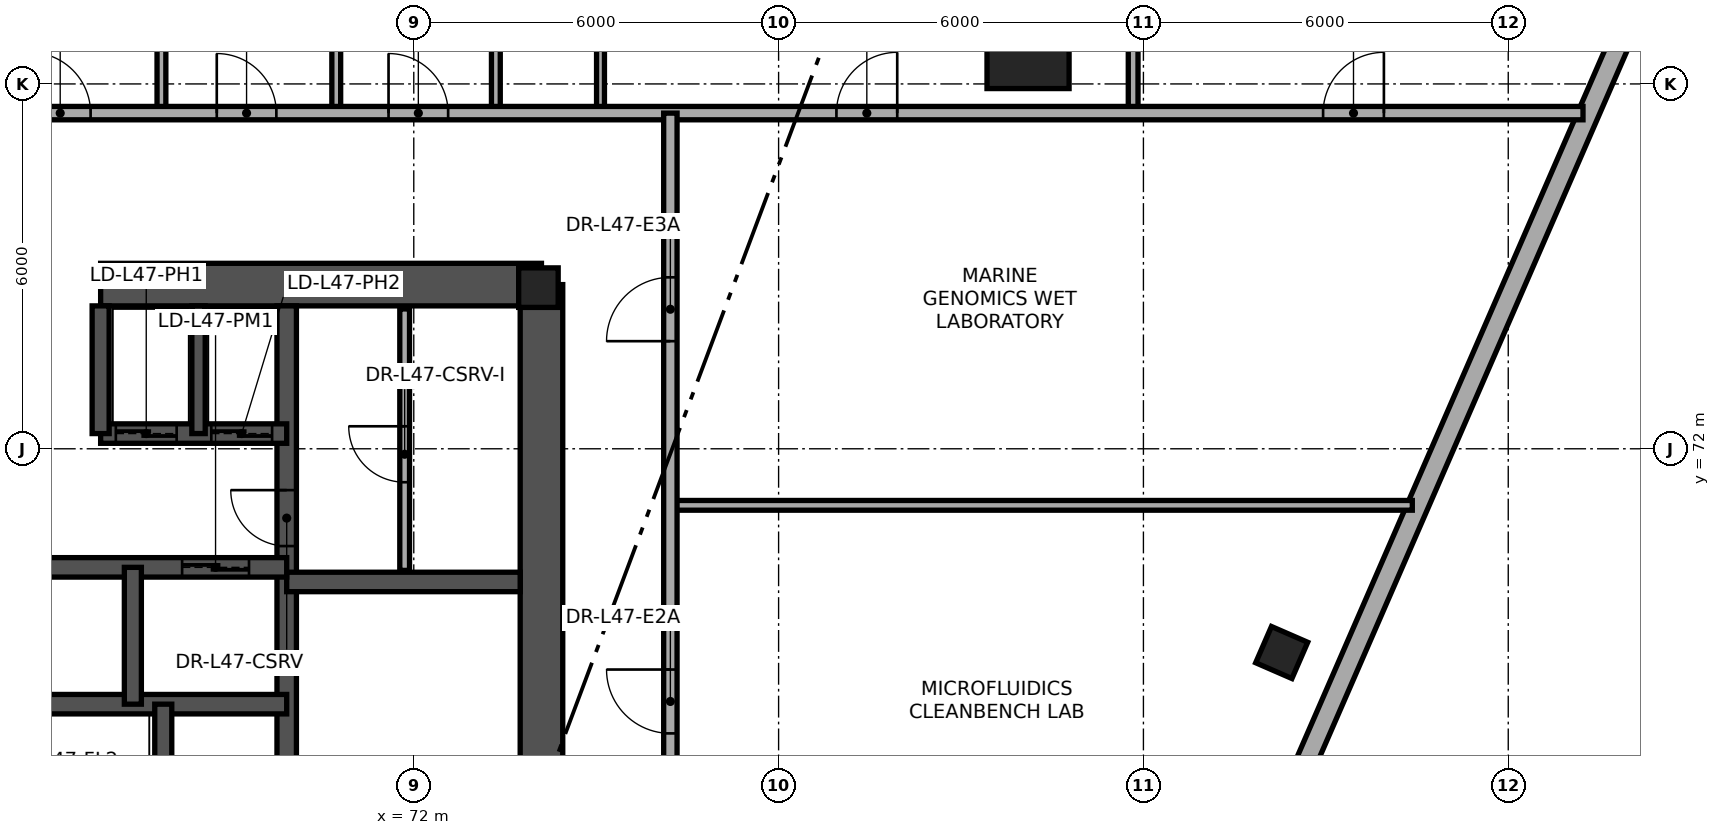
"""IFC4 building model, lengths in metres.
Left out: names, types, materials, properties, quantities, classifications, styles, units other than length and angle.
Written with IfcOpenShell. Run it as: python <this file> out.ifc"""

import sys

from ifc_helpers import new_model, si_unit, direction, frame, frame_2d, origin, origin_2d, place, context, subcontext, project, spatial, rectangle, extrude, element, fill, save


model = new_model("IFC4")
c1 = context("Model", 3, precision=1e-05, world=origin(), true_north=direction((0.0, 1.0)))
c2 = subcontext(c1, "Body", "Model", "MODEL_VIEW")
j1 = project(units=[si_unit("LENGTHUNIT", "METRE"), si_unit("PLANEANGLEUNIT", "RADIAN")], contexts=[c1])
p1 = place(None, origin())
s1 = spatial("IfcSite", under=j1, at=p1, CompositionType="ELEMENT")
p2 = place(p1, origin())
s2 = spatial("IfcBuilding", under=s1, at=p2, CompositionType="ELEMENT")
p3 = place(p2, frame((0.0, 0.0, 179.4)))
s3 = spatial("IfcBuildingStorey", under=s2, at=p3, CompositionType="ELEMENT", Elevation=179.4)
p4 = place(p3, frame((74.1, 61.3, 0.0), z_axis=(0.0, 0.0, 1.0), x_axis=(0.0, 1.0, 0.0)))
e1 = element("IfcWall", 1, at=p4, inside=s3, PredefinedType="SHEAR", context=c2, shape_type="SweptSolid", body=[
    extrude(rectangle(XDim=13.4, YDim=0.7, at=frame_2d((6.7, 0.0))), origin(), (0.0, 0.0, 1.0), 3.65),
])
p5 = place(p3, frame((74.1, 74.7, 0.0), z_axis=(0.0, 0.0, 1.0), x_axis=(-1.0, 0.0, 0.0)))
e2 = element("IfcWall", 2, at=p5, inside=s3, PredefinedType="SHEAR", context=c2, shape_type="SweptSolid", body=[
    extrude(rectangle(XDim=7.25, YDim=0.7, at=frame_2d((3.625, 0.0))), origin(), (0.0, 0.0, 1.0), 3.65),
])
p6 = place(p3, frame((69.91, 61.65, 0.0), z_axis=(0.0, 0.0, 1.0), x_axis=(0.0, 1.0, 0.0)))
e3 = element("IfcWall", 3, at=p6, inside=s3, PredefinedType="SHEAR", context=c2, shape_type="SweptSolid", body=[
    extrude(rectangle(XDim=12.7, YDim=0.32, at=frame_2d((6.35, 0.0))), origin(), (0.0, 0.0, 1.0), 3.65),
])
p7 = place(p6, frame((8.75, 0.0, 0.0)))
e4 = element("IfcOpeningElement", 4, at=p7, cuts=e3, PredefinedType="OPENING", context=c2, shape_type="SweptSolid", body=[
    extrude(rectangle(XDim=0.92, YDim=2.05, at=frame_2d((0.46, 1.025))), frame((0.0, 0.17, 0.0), z_axis=(0.0, -1.0, 0.0), x_axis=(1.0, 0.0, 0.0)), (0.0, 0.0, 1.0), 0.34),
])
p8 = place(p3, frame((69.91, 69.81, 0.0), z_axis=(0.0, 0.0, 1.0), x_axis=(1.0, 0.0, 0.0)))
e5 = element("IfcWall", 5, at=p8, inside=s3, PredefinedType="SHEAR", context=c2, shape_type="SweptSolid", body=[
    extrude(rectangle(XDim=3.84, YDim=0.32, at=frame_2d((1.92, 0.0))), origin(), (0.0, 0.0, 1.0), 3.65),
])
p9 = place(p3, frame((62.09, 67.8, 0.0), z_axis=(0.0, 0.0, 1.0), x_axis=(1.0, 0.0, 0.0)))
e6 = element("IfcWall", 6, at=p9, inside=s3, PredefinedType="SHEAR", context=c2, shape_type="SweptSolid", body=[
    extrude(rectangle(XDim=7.82, YDim=0.32, at=frame_2d((3.91, 0.0))), origin(), (0.0, 0.0, 1.0), 3.65),
])
p10 = place(p3, frame((62.09, 70.05, 0.0), z_axis=(0.0, 0.0, 1.0), x_axis=(1.0, 0.0, 0.0)))
e7 = element("IfcWall", 7, at=p10, inside=s3, PredefinedType="SHEAR", context=c2, shape_type="SweptSolid", body=[
    extrude(rectangle(XDim=7.82, YDim=0.32, at=frame_2d((3.91, 0.0))), origin(), (0.0, 0.0, 1.0), 3.65),
])
p11 = place(p10, frame((1.8, 0.0, 0.0)))
e8 = element("IfcOpeningElement", 8, at=p11, cuts=e7, PredefinedType="OPENING", context=c2, shape_type="SweptSolid", body=[
    extrude(rectangle(XDim=1.05, YDim=2.15, at=frame_2d((0.525, 1.075))), frame((0.0, 0.17, 0.0), z_axis=(0.0, -1.0, 0.0), x_axis=(1.0, 0.0, 0.0)), (0.0, 0.0, 1.0), 0.34),
])
p12 = place(p10, frame((6.1, 0.0, 0.0)))
e9 = element("IfcOpeningElement", 9, at=p12, cuts=e7, PredefinedType="OPENING", context=c2, shape_type="SweptSolid", body=[
    extrude(rectangle(XDim=1.1, YDim=2.2, at=frame_2d((0.55, 1.1))), frame((0.0, 0.17, 0.0), z_axis=(0.0, -1.0, 0.0), x_axis=(1.0, 0.0, 0.0)), (0.0, 0.0, 1.0), 0.34),
])
p13 = place(p3, frame((66.85, 72.25, 0.0), z_axis=(0.0, 0.0, 1.0), x_axis=(1.0, 0.0, 0.0)))
e10 = element("IfcWall", 10, at=p13, inside=s3, PredefinedType="SHEAR", context=c2, shape_type="SweptSolid", body=[
    extrude(rectangle(XDim=3.06, YDim=0.32, at=frame_2d((1.53, 0.0))), origin(), (0.0, 0.0, 1.0), 3.65),
])
p14 = place(p13, frame((0.25, 0.0, 0.0)))
e11 = element("IfcOpeningElement", 11, at=p14, cuts=e10, PredefinedType="OPENING", context=c2, shape_type="SweptSolid", body=[
    extrude(rectangle(XDim=1.0, YDim=2.2, at=frame_2d((0.5, 1.1))), frame((0.0, 0.17, 0.0), z_axis=(0.0, -1.0, 0.0), x_axis=(1.0, 0.0, 0.0)), (0.0, 0.0, 1.0), 0.34),
])
p15 = place(p13, frame((1.82, 0.0, 0.0)))
e12 = element("IfcOpeningElement", 12, at=p15, cuts=e10, PredefinedType="OPENING", context=c2, shape_type="SweptSolid", body=[
    extrude(rectangle(XDim=1.0, YDim=2.2, at=frame_2d((0.5, 1.1))), frame((0.0, 0.17, 0.0), z_axis=(0.0, -1.0, 0.0), x_axis=(1.0, 0.0, 0.0)), (0.0, 0.0, 1.0), 0.34),
])
p16 = place(p3, frame((66.85, 72.25, 0.0), z_axis=(0.0, 0.0, 1.0), x_axis=(0.0, 1.0, 0.0)))
e13 = element("IfcWall", 13, at=p16, inside=s3, PredefinedType="SHEAR", context=c2, shape_type="SweptSolid", body=[
    extrude(rectangle(XDim=2.1, YDim=0.28, at=frame_2d((1.05, 0.0))), origin(), (0.0, 0.0, 1.0), 3.65),
])
p17 = place(p3, frame((68.46, 72.25, 0.0), z_axis=(0.0, 0.0, 1.0), x_axis=(0.0, 1.0, 0.0)))
e14 = element("IfcWall", 14, at=p17, inside=s3, PredefinedType="SHEAR", context=c2, shape_type="SweptSolid", body=[
    extrude(rectangle(XDim=2.1, YDim=0.22, at=frame_2d((1.05, 0.0))), origin(), (0.0, 0.0, 1.0), 3.65),
])
p18 = place(p3, frame((67.88, 61.65, 0.0), z_axis=(0.0, 0.0, 1.0), x_axis=(0.0, 1.0, 0.0)))
e15 = element("IfcWall", 15, at=p18, inside=s3, PredefinedType="SHEAR", context=c2, shape_type="SweptSolid", body=[
    extrude(rectangle(XDim=6.15, YDim=0.28, at=frame_2d((3.075, 0.0))), origin(), (0.0, 0.0, 1.0), 3.65),
])
p19 = place(p18, frame((1.1, 0.0, 0.0)))
e16 = element("IfcOpeningElement", 16, at=p19, cuts=e15, PredefinedType="OPENING", context=c2, shape_type="SweptSolid", body=[
    extrude(rectangle(XDim=0.92, YDim=2.05, at=frame_2d((0.46, 1.025))), frame((0.0, 0.15, 0.0), z_axis=(0.0, -1.0, 0.0), x_axis=(1.0, 0.0, 0.0)), (0.0, 0.0, 1.0), 0.3),
])
p20 = place(p3, frame((67.38, 67.8, 0.0), z_axis=(0.0, 0.0, 1.0), x_axis=(0.0, 1.0, 0.0)))
e17 = element("IfcWall", 17, at=p20, inside=s3, PredefinedType="SHEAR", context=c2, shape_type="SweptSolid", body=[
    extrude(rectangle(XDim=2.25, YDim=0.28, at=frame_2d((1.125, 0.0))), origin(), (0.0, 0.0, 1.0), 3.65),
])
p21 = place(p3, frame((74.05, 74.65, 0.0), z_axis=(0.0, 0.0, 1.0), x_axis=(1.0, 0.0, 0.0)))
e18 = element("IfcColumn", 18, at=p21, inside=s3, PredefinedType="COLUMN", context=c2, shape_type="SweptSolid", body=[
    extrude(rectangle(XDim=0.65, YDim=0.65, at=origin_2d()), origin(), (0.0, 0.0, 1.0), 3.65),
])
p22 = place(p3, frame((82.102, 78.599, 0.0), z_axis=(0.0, 0.0, 1.0), x_axis=(1.0, 0.0, 0.0)))
e19 = element("IfcColumn", 19, at=p22, inside=s3, PredefinedType="COLUMN", context=c2, shape_type="SweptSolid", body=[
    extrude(rectangle(XDim=1.35, YDim=1.35, at=origin_2d()), origin(), (0.0, 0.0, 1.0), 3.65),
])
p23 = place(p3, frame((86.346, 68.66, 0.003), z_axis=(-0.039229493406, -0.00569028488, 0.999214024874), x_axis=(0.963969673558, -0.263517553175, 0.036345118363)))
e20 = element("IfcColumn", 20, at=p23, inside=s3, PredefinedType="COLUMN", context=c2, shape_type="SweptSolid", body=[
    extrude(rectangle(XDim=0.65, YDim=0.65, at=origin_2d()), origin(), (0.0, 0.0, 1.0), 3.647),
])
p24 = place(p3, frame((92.464, 80.144, 0.0), z_axis=(0.0, 0.0, 1.0), x_axis=(-0.399091286562, -0.916911197985, 0.0)))
e21 = element("IfcWall", 21, at=p24, inside=s3, PredefinedType="STANDARD", context=c2, shape_type="SweptSolid", body=[
    extrude(rectangle(XDim=54.364, YDim=0.34, at=frame_2d((27.182, 0.0))), origin(), (0.0, 0.0, 1.0), 0.85),
])
p25 = place(p3, frame((71.85, 70.0, 0.0), z_axis=(0.0, 0.0, 1.0), x_axis=(0.0, 1.0, 0.0)))
e22 = element("IfcWall", 22, at=p25, inside=s3, PredefinedType="PARTITIONING", context=c2, shape_type="SweptSolid", body=[
    extrude(rectangle(XDim=4.3, YDim=0.16, at=frame_2d((2.15, 0.0))), origin(), (0.0, 0.0, 1.0), 3.4),
])
p26 = place(p25, frame((1.45, 0.0, 0.0)))
e23 = element("IfcOpeningElement", 23, at=p26, cuts=e22, PredefinedType="OPENING", context=c2, shape_type="SweptSolid", body=[
    extrude(rectangle(XDim=0.92, YDim=2.05, at=frame_2d((0.46, 1.025))), frame((0.0, 0.09, 0.0), z_axis=(0.0, -1.0, 0.0), x_axis=(1.0, 0.0, 0.0)), (0.0, 0.0, 1.0), 0.18),
])
for number, where, z_axis, x_axis in (
    (24, (67.85, 77.52, 0.0), (0.0, 0.0, 1.0), (0.0, 1.0, 0.0)),
    (25, (70.725, 77.52, 0.0), (0.0, 0.0, 1.0), (0.0, 1.0, 0.0)),
):
    element("IfcWall", number, at=place(p3, frame(where, z_axis=z_axis, x_axis=x_axis)), inside=s3, PredefinedType="PARTITIONING", context=c2, shape_type="SweptSolid", body=[
        extrude(rectangle(XDim=2.55, YDim=0.145, at=frame_2d((1.275, 0.0))), origin(), (0.0, 0.0, 1.0), 2.78),
    ])
p27 = place(p3, frame((73.35, 77.52, 0.0), z_axis=(0.0, 0.0, 1.0), x_axis=(0.0, 1.0, 0.0)))
e26 = element("IfcWall", 26, at=p27, inside=s3, PredefinedType="PARTITIONING", context=c2, shape_type="SweptSolid", body=[
    extrude(rectangle(XDim=2.55, YDim=0.145, at=frame_2d((1.275, 0.0))), origin(), (0.0, 0.0, 1.0), 3.4),
])
p28 = place(p3, frame((75.071, 77.52, 0.0), z_axis=(0.0, 0.0, 1.0), x_axis=(0.0, 1.0, 0.0)))
e27 = element("IfcWall", 27, at=p28, inside=s3, PredefinedType="PARTITIONING", context=c2, shape_type="SweptSolid", body=[
    extrude(rectangle(XDim=9.814, YDim=0.13, at=frame_2d((4.907, 0.0))), origin(), (0.0, 0.0, 1.0), 2.6),
])
p29 = place(p3, frame((83.831, 77.52, 0.0), z_axis=(0.0, 0.0, 1.0), x_axis=(0.0, 1.0, 0.0)))
e28 = element("IfcWall", 28, at=p29, inside=s3, PredefinedType="PARTITIONING", context=c2, shape_type="SweptSolid", body=[
    extrude(rectangle(XDim=9.814, YDim=0.16, at=frame_2d((4.907, 0.0))), origin(), (0.0, 0.0, 1.0), 3.4),
])
p30 = place(p3, frame((57.55, 77.52, 0.0), z_axis=(0.0, 0.0, 1.0), x_axis=(1.0, 0.0, 0.0)))
e29 = element("IfcWall", 29, at=p30, inside=s3, PredefinedType="PARTITIONING", context=c2, shape_type="SweptSolid", body=[
    extrude(rectangle(XDim=33.679, YDim=0.22, at=frame_2d((16.84, 0.0))), origin(), (0.0, 0.0, 1.0), 2.6),
])
p31 = place(p30, frame((11.21, 0.0, 0.0)))
e30 = element("IfcOpeningElement", 30, at=p31, cuts=e29, PredefinedType="OPENING", context=c2, shape_type="SweptSolid", body=[
    extrude(rectangle(XDim=0.98, YDim=2.1, at=frame_2d((0.49, 1.05))), frame((0.0, 0.12, 0.0), z_axis=(0.0, -1.0, 0.0), x_axis=(1.0, 0.0, 0.0)), (0.0, 0.0, 1.0), 0.24),
])
p32 = place(p30, frame((14.035, 0.0, 0.0)))
e31 = element("IfcOpeningElement", 31, at=p32, cuts=e29, PredefinedType="OPENING", context=c2, shape_type="SweptSolid", body=[
    extrude(rectangle(XDim=0.98, YDim=2.1, at=frame_2d((0.49, 1.05))), frame((0.0, 0.12, 0.0), z_axis=(0.0, -1.0, 0.0), x_axis=(1.0, 0.0, 0.0)), (0.0, 0.0, 1.0), 0.24),
])
p33 = place(p30, frame((3.1, 0.0, 0.0)))
e32 = element("IfcOpeningElement", 32, at=p33, cuts=e29, PredefinedType="OPENING", context=c2, shape_type="SweptSolid", body=[
    extrude(rectangle(XDim=1.0, YDim=2.1, at=frame_2d((0.5, 1.05))), frame((0.0, 0.12, 0.0), z_axis=(0.0, -1.0, 0.0), x_axis=(1.0, 0.0, 0.0)), (0.0, 0.0, 1.0), 0.24),
])
p34 = place(p30, frame((8.135, 0.0, 0.0)))
e33 = element("IfcOpeningElement", 33, at=p34, cuts=e29, PredefinedType="OPENING", context=c2, shape_type="SweptSolid", body=[
    extrude(rectangle(XDim=1.0, YDim=2.1, at=frame_2d((0.5, 1.05))), frame((0.0, 0.12, 0.0), z_axis=(0.0, -1.0, 0.0), x_axis=(1.0, 0.0, 0.0)), (0.0, 0.0, 1.0), 0.24),
])
p35 = place(p30, frame((21.401, 0.0, 0.0)))
e34 = element("IfcOpeningElement", 34, at=p35, cuts=e29, PredefinedType="OPENING", context=c2, shape_type="SweptSolid", body=[
    extrude(rectangle(XDim=1.0, YDim=2.1, at=frame_2d((0.5, 1.05))), frame((0.0, 0.12, 0.0), z_axis=(0.0, -1.0, 0.0), x_axis=(1.0, 0.0, 0.0)), (0.0, 0.0, 1.0), 0.24),
])
p36 = place(p30, frame((29.405, 0.0, 0.0)))
e35 = element("IfcOpeningElement", 35, at=p36, cuts=e29, PredefinedType="OPENING", context=c2, shape_type="SweptSolid", body=[
    extrude(rectangle(XDim=1.0, YDim=2.1, at=frame_2d((0.5, 1.05))), frame((0.0, 0.12, 0.0), z_axis=(0.0, -1.0, 0.0), x_axis=(1.0, 0.0, 0.0)), (0.0, 0.0, 1.0), 0.24),
])
p37 = place(p3, frame((76.22, 71.07, 0.0), z_axis=(0.0, 0.0, 1.0), x_axis=(1.0, 0.0, 0.0)))
e36 = element("IfcWall", 36, at=p37, inside=s3, PredefinedType="PARTITIONING", context=c2, shape_type="SweptSolid", body=[
    extrude(rectangle(XDim=12.202, YDim=0.16, at=frame_2d((6.101, 0.0))), origin(), (0.0, 0.0, 1.0), 2.6),
])
p38 = place(p3, frame((76.22, 43.036, 0.0), z_axis=(0.0, 0.0, 1.0), x_axis=(0.0, 1.0, 0.0)))
e37 = element("IfcWall", 37, at=p38, inside=s3, PredefinedType="PARTITIONING", context=c2, shape_type="SweptSolid", body=[
    extrude(rectangle(XDim=34.484, YDim=0.22, at=frame_2d((17.242, 0.0))), origin(), (0.0, 0.0, 1.0), 2.6),
])
p39 = place(p38, frame((17.834, 0.0, 0.0)))
e38 = element("IfcOpeningElement", 38, at=p39, cuts=e37, PredefinedType="OPENING", context=c2, shape_type="SweptSolid", body=[
    extrude(rectangle(XDim=1.05, YDim=2.15, at=frame_2d((0.525, 1.075))), frame((0.0, 0.12, 0.0), z_axis=(0.0, -1.0, 0.0), x_axis=(1.0, 0.0, 0.0)), (0.0, 0.0, 1.0), 0.24),
])
p40 = place(p38, frame((24.284, 0.0, 0.0)))
e39 = element("IfcOpeningElement", 39, at=p40, cuts=e37, PredefinedType="OPENING", context=c2, shape_type="SweptSolid", body=[
    extrude(rectangle(XDim=1.05, YDim=2.15, at=frame_2d((0.525, 1.075))), frame((0.0, 0.12, 0.0), z_axis=(0.0, -1.0, 0.0), x_axis=(1.0, 0.0, 0.0)), (0.0, 0.0, 1.0), 0.24),
])
p41 = place(p38, frame((30.734, 0.0, 0.0)))
e40 = element("IfcOpeningElement", 40, at=p41, cuts=e37, PredefinedType="OPENING", context=c2, shape_type="SweptSolid", body=[
    extrude(rectangle(XDim=1.05, YDim=2.15, at=frame_2d((0.525, 1.075))), frame((0.0, 0.12, 0.0), z_axis=(0.0, -1.0, 0.0), x_axis=(1.0, 0.0, 0.0)), (0.0, 0.0, 1.0), 0.24),
])
p42 = place(p12, origin())
e41 = element("IfcDoor", 41, at=p42, inside=s3, OperationType="SLIDING_TO_LEFT", PredefinedType="DOOR", context=c2, shape_type="SweptSolid", body=[
    extrude(rectangle(XDim=1.1, YDim=2.2, at=frame_2d((0.55, 1.1))), frame((0.0, 0.025, 0.0), z_axis=(0.0, -1.0, 0.0), x_axis=(1.0, 0.0, 0.0)), (0.0, 0.0, 1.0), 0.05),
])
fill(e9, e41)
p43 = place(p14, origin())
e42 = element("IfcDoor", 42, at=p43, inside=s3, OperationType="SLIDING_TO_LEFT", PredefinedType="DOOR", context=c2, shape_type="SweptSolid", body=[
    extrude(rectangle(XDim=1.0, YDim=2.2, at=frame_2d((0.5, 1.1))), frame((0.0, 0.025, 0.0), z_axis=(0.0, -1.0, 0.0), x_axis=(1.0, 0.0, 0.0)), (0.0, 0.0, 1.0), 0.05),
])
fill(e11, e42)
p44 = place(p15, origin())
e43 = element("IfcDoor", 43, at=p44, inside=s3, OperationType="SLIDING_TO_LEFT", PredefinedType="DOOR", context=c2, shape_type="SweptSolid", body=[
    extrude(rectangle(XDim=1.0, YDim=2.2, at=frame_2d((0.5, 1.1))), frame((0.0, 0.025, 0.0), z_axis=(0.0, -1.0, 0.0), x_axis=(1.0, 0.0, 0.0)), (0.0, 0.0, 1.0), 0.05),
])
fill(e12, e43)
p45 = place(p7, origin())
e44 = element("IfcDoor", 44, at=p45, inside=s3, OperationType="SINGLE_SWING_RIGHT", PredefinedType="DOOR", context=c2, shape_type="SweptSolid", body=[
    extrude(rectangle(XDim=0.92, YDim=2.05, at=frame_2d((0.46, 1.025))), frame((0.0, 0.025, 0.0), z_axis=(0.0, -1.0, 0.0), x_axis=(1.0, 0.0, 0.0)), (0.0, 0.0, 1.0), 0.05),
])
fill(e4, e44)
p46 = place(p26, origin())
e45 = element("IfcDoor", 45, at=p46, inside=s3, OperationType="SINGLE_SWING_RIGHT", PredefinedType="DOOR", context=c2, shape_type="SweptSolid", body=[
    extrude(rectangle(XDim=0.92, YDim=2.05, at=frame_2d((0.46, 1.025))), frame((0.0, 0.025, 0.0), z_axis=(0.0, -1.0, 0.0), x_axis=(1.0, 0.0, 0.0)), (0.0, 0.0, 1.0), 0.05),
])
fill(e23, e45)
p47 = place(p31, origin())
e46 = element("IfcDoor", 46, at=p47, inside=s3, OperationType="SINGLE_SWING_LEFT", PredefinedType="DOOR", context=c2, shape_type="SweptSolid", body=[
    extrude(rectangle(XDim=0.98, YDim=2.1, at=frame_2d((0.49, 1.05))), frame((0.0, 0.025, 0.0), z_axis=(0.0, -1.0, 0.0), x_axis=(1.0, 0.0, 0.0)), (0.0, 0.0, 1.0), 0.05),
])
fill(e30, e46)
p48 = place(p32, origin())
e47 = element("IfcDoor", 47, at=p48, inside=s3, OperationType="SINGLE_SWING_LEFT", PredefinedType="DOOR", context=c2, shape_type="SweptSolid", body=[
    extrude(rectangle(XDim=0.98, YDim=2.1, at=frame_2d((0.49, 1.05))), frame((0.0, 0.025, 0.0), z_axis=(0.0, -1.0, 0.0), x_axis=(1.0, 0.0, 0.0)), (0.0, 0.0, 1.0), 0.05),
])
fill(e31, e47)
p49 = place(p34, origin())
e48 = element("IfcDoor", 48, at=p49, inside=s3, OperationType="SINGLE_SWING_LEFT", PredefinedType="DOOR", context=c2, shape_type="SweptSolid", body=[
    extrude(rectangle(XDim=1.0, YDim=2.1, at=frame_2d((0.5, 1.05))), frame((0.0, 0.025, 0.0), z_axis=(0.0, -1.0, 0.0), x_axis=(1.0, 0.0, 0.0)), (0.0, 0.0, 1.0), 0.05),
])
fill(e33, e48)
p50 = place(p35, origin())
e49 = element("IfcDoor", 49, at=p50, inside=s3, OperationType="SINGLE_SWING_RIGHT", PredefinedType="DOOR", context=c2, shape_type="SweptSolid", body=[
    extrude(rectangle(XDim=1.0, YDim=2.1, at=frame_2d((0.5, 1.05))), frame((0.0, 0.025, 0.0), z_axis=(0.0, -1.0, 0.0), x_axis=(1.0, 0.0, 0.0)), (0.0, 0.0, 1.0), 0.05),
])
fill(e34, e49)
p51 = place(p36, origin())
e50 = element("IfcDoor", 50, at=p51, inside=s3, OperationType="SINGLE_SWING_RIGHT", PredefinedType="DOOR", context=c2, shape_type="SweptSolid", body=[
    extrude(rectangle(XDim=1.0, YDim=2.1, at=frame_2d((0.5, 1.05))), frame((0.0, 0.025, 0.0), z_axis=(0.0, -1.0, 0.0), x_axis=(1.0, 0.0, 0.0)), (0.0, 0.0, 1.0), 0.05),
])
fill(e35, e50)
p52 = place(p40, origin())
e51 = element("IfcDoor", 51, at=p52, inside=s3, OperationType="SINGLE_SWING_RIGHT", PredefinedType="DOOR", context=c2, shape_type="SweptSolid", body=[
    extrude(rectangle(XDim=1.05, YDim=2.15, at=frame_2d((0.525, 1.075))), frame((0.0, 0.025, 0.0), z_axis=(0.0, -1.0, 0.0), x_axis=(1.0, 0.0, 0.0)), (0.0, 0.0, 1.0), 0.05),
])
fill(e39, e51)
p53 = place(p41, origin())
e52 = element("IfcDoor", 52, at=p53, inside=s3, OperationType="SINGLE_SWING_LEFT", PredefinedType="DOOR", context=c2, shape_type="SweptSolid", body=[
    extrude(rectangle(XDim=1.05, YDim=2.15, at=frame_2d((0.525, 1.075))), frame((0.0, 0.025, 0.0), z_axis=(0.0, -1.0, 0.0), x_axis=(1.0, 0.0, 0.0)), (0.0, 0.0, 1.0), 0.05),
])
fill(e40, e52)
save(model, sys.argv[1])
